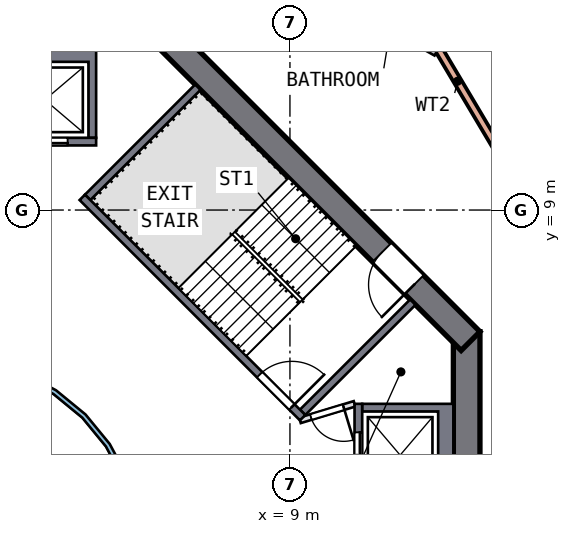
"""IFC4 building model, lengths in metres.
Left out: names, types, materials, properties, quantities, classifications, styles, units other than length and angle.
Written with IfcOpenShell. Run it as: python <this file> out.ifc"""

import sys

from ifc_helpers import new_model, si_unit, direction, frame, frame_2d, origin, place, context, subcontext, project, spatial, polyline, rectangle, outline, extrude, element, fill, save


model = new_model("IFC4")
c1 = context("Model", 3, precision=1e-05, world=origin(), true_north=direction((0.0, 1.0)))
c2 = subcontext(c1, "Body", "Model", "MODEL_VIEW")
j1 = project(units=[si_unit("LENGTHUNIT", "METRE"), si_unit("PLANEANGLEUNIT", "RADIAN")], contexts=[c1])
p1 = place(None, origin())
s1 = spatial("IfcSite", under=j1, at=p1, CompositionType="ELEMENT")
p2 = place(p1, origin())
s2 = spatial("IfcBuilding", under=s1, at=p2, CompositionType="ELEMENT")
p3 = place(p2, frame((0.0, 0.0, 158.5)))
s3 = spatial("IfcBuildingStorey", under=s2, at=p3, CompositionType="ELEMENT", Elevation=158.5)
p4 = place(p3, frame((13.65, -5.799, 0.0), z_axis=(0.0, 0.0, 1.0), x_axis=(0.0, 1.0, 0.0)))
e1 = element("IfcWall", 1, at=p4, inside=s3, PredefinedType="SHEAR", context=c2, shape_type="SweptSolid", body=[
    extrude(rectangle(XDim=11.598, YDim=0.7, at=frame_2d((5.799, 0.0))), origin(), (0.0, 0.0, 1.0), 3.5),
])
p5 = place(p4, frame((4.899, 0.0, 0.0)))
e2 = element("IfcOpeningElement", 2, at=p5, cuts=e1, PredefinedType="OPENING", context=c2, shape_type="SweptSolid", body=[
    extrude(rectangle(XDim=1.8, YDim=2.1, at=frame_2d((0.9, 1.05))), frame((0.0, 0.36, 0.0), z_axis=(0.0, -1.0, 0.0), x_axis=(1.0, 0.0, 0.0)), (0.0, 0.0, 1.0), 0.72),
])
p6 = place(p3, frame((13.752, 5.552, 0.0), z_axis=(0.0, 0.0, 1.0), x_axis=(-0.707106781, 0.707106781, 0.0)))
e3 = element("IfcWall", 3, at=p6, inside=s3, PredefinedType="SHEAR", context=c2, shape_type="SweptSolid", body=[
    extrude(rectangle(XDim=11.598, YDim=0.7, at=frame_2d((5.799, 0.0))), origin(), (0.0, 0.0, 1.0), 3.5),
])
p7 = place(p6, frame((2.099, 0.0, 0.0)))
e4 = element("IfcOpeningElement", 4, at=p7, cuts=e3, PredefinedType="OPENING", context=c2, shape_type="SweptSolid", body=[
    extrude(rectangle(XDim=1.2, YDim=2.1, at=frame_2d((0.6, 1.05))), frame((0.0, 0.36, 0.0), z_axis=(0.0, -1.0, 0.0), x_axis=(1.0, 0.0, 0.0)), (0.0, 0.0, 1.0), 0.72),
])
p8 = place(p3, frame((12.032, 14.711, 0.0), z_axis=(0.0, 0.0, 1.0), x_axis=(0.510837252, -0.859677441, 0.0)))
e5 = element("IfcWall", 5, at=p8, inside=s3, PredefinedType="SOLIDWALL", context=c2, shape_type="SweptSolid", body=[
    extrude(rectangle(XDim=13.0, YDim=0.2, at=frame_2d((6.5, 0.0))), origin(), (0.0, 0.0, 1.0), 3.19),
])
p9 = place(p8, frame((5.6, 0.0, 0.0)))
e6 = element("IfcOpeningElement", 6, at=p9, cuts=e5, PredefinedType="OPENING", context=c2, shape_type="SweptSolid", body=[
    extrude(rectangle(XDim=1.8, YDim=2.4, at=frame_2d((0.9, 1.2))), frame((0.0, 0.11, 0.0), z_axis=(0.0, -1.0, 0.0), x_axis=(1.0, 0.0, 0.0)), (0.0, 0.0, 1.0), 0.22),
])
p10 = place(p3, origin())
e7 = element("IfcWall", 7, at=p10, inside=s3, PredefinedType="SOLIDWALL", context=c2, shape_type="SweptSolid", body=[
    extrude(outline(polyline([(13.3, 3.9), (13.3, 1.2), (10.9, 1.2), (10.9, 1.4), (12.9, 1.4), (12.9, 3.7), (10.9, 3.7), (10.9, 3.9), (13.3, 3.9)])), origin(), (0.0, 0.0, 1.0), 3.19),
])
p11 = place(p3, frame((10.8, 1.2, 0.0), z_axis=(0.0, 0.0, 1.0), x_axis=(0.0, 1.0, 0.0)))
e8 = element("IfcWall", 8, at=p11, inside=s3, PredefinedType="SOLIDWALL", context=c2, shape_type="SweptSolid", body=[
    extrude(rectangle(XDim=2.7, YDim=0.2, at=frame_2d((1.35, 0.0))), origin(), (0.0, 0.0, 1.0), 3.19),
])
p12 = place(p11, frame((0.75, 0.0, 0.0)))
e9 = element("IfcOpeningElement", 9, at=p12, cuts=e8, PredefinedType="OPENING", context=c2, shape_type="SweptSolid", body=[
    extrude(rectangle(XDim=1.2, YDim=2.1, at=frame_2d((0.6, 1.05))), frame((0.0, 0.11, 0.0), z_axis=(0.0, -1.0, 0.0), x_axis=(1.0, 0.0, 0.0)), (0.0, 0.0, 1.0), 0.22),
])
p13 = place(p3, origin())
e10 = element("IfcWall", 10, at=p13, inside=s3, PredefinedType="SOLIDWALL", context=c2, shape_type="SweptSolid", body=[
    extrude(outline(polyline([(3.9, 13.3), (3.9, 10.9), (3.7, 10.9), (3.7, 12.9), (1.4, 12.9), (1.4, 10.9), (1.2, 10.9), (1.2, 13.3), (3.9, 13.3)])), origin(), (0.0, 0.0, 1.0), 3.19),
])
p14 = place(p3, frame((1.2, 10.8, 0.0), z_axis=(0.0, 0.0, 1.0), x_axis=(1.0, 0.0, 0.0)))
e11 = element("IfcWall", 11, at=p14, inside=s3, PredefinedType="SOLIDWALL", context=c2, shape_type="SweptSolid", body=[
    extrude(rectangle(XDim=2.7, YDim=0.2, at=frame_2d((1.35, 0.0))), origin(), (0.0, 0.0, 1.0), 3.19),
])
p15 = place(p14, frame((0.75, 0.0, 0.0)))
e12 = element("IfcOpeningElement", 12, at=p15, cuts=e11, PredefinedType="OPENING", context=c2, shape_type="SweptSolid", body=[
    extrude(rectangle(XDim=1.2, YDim=2.1, at=frame_2d((0.6, 1.05))), frame((0.0, 0.11, 0.0), z_axis=(0.0, -1.0, 0.0), x_axis=(1.0, 0.0, 0.0)), (0.0, 0.0, 1.0), 0.22),
])
p16 = place(p3, frame((3.535, 9.334, 0.0), z_axis=(0.0, 0.0, 1.0), x_axis=(0.707106781, -0.707106781, 0.0)))
e13 = element("IfcWall", 13, at=p16, inside=s3, PredefinedType="SOLIDWALL", context=c2, shape_type="SweptSolid", body=[
    extrude(rectangle(XDim=8.2, YDim=0.2, at=frame_2d((4.1, 0.0))), origin(), (0.0, 0.0, 1.0), 3.19),
])
p17 = place(p16, frame((6.6, 0.0, 0.0)))
e14 = element("IfcOpeningElement", 14, at=p17, cuts=e13, PredefinedType="OPENING", context=c2, shape_type="SweptSolid", body=[
    extrude(rectangle(XDim=1.2, YDim=2.1, at=frame_2d((0.6, 1.05))), frame((0.0, 0.11, 0.0), z_axis=(0.0, -1.0, 0.0), x_axis=(1.0, 0.0, 0.0)), (0.0, 0.0, 1.0), 0.22),
])
for number, where, z_axis, x_axis in (
    (15, (9.334, 3.677, 0.0), (0.0, 0.0, 1.0), (0.707, 0.707, 0.0)),
    (16, (3.677, 9.334, 0.0), (0.0, 0.0, 1.0), (0.707, 0.707, 0.0)),
):
    element("IfcWall", number, at=place(p3, frame(where, z_axis=z_axis, x_axis=x_axis)), inside=s3, PredefinedType="SOLIDWALL", context=c2, shape_type="SweptSolid", body=[
        extrude(rectangle(XDim=4.1, YDim=0.2, at=frame_2d((2.05, 0.0))), origin(), (0.0, 0.0, 1.0), 3.19),
    ])
p18 = place(p3, frame((10.7, 3.9, 0.0), z_axis=(0.0, 0.0, 1.0), x_axis=(-0.957084567, -0.289808785, 0.0)))
e17 = element("IfcWall", 17, at=p18, inside=s3, PredefinedType="PARTITIONING", context=c2, shape_type="SweptSolid", body=[
    extrude(rectangle(XDim=1.501, YDim=0.15, at=frame_2d((0.75, 0.0))), origin(), (0.0, 0.0, 1.0), 3.19),
])
p19 = place(p18, frame((0.301, 0.0, 0.0)))
e18 = element("IfcOpeningElement", 18, at=p19, cuts=e17, PredefinedType="OPENING", context=c2, shape_type="SweptSolid", body=[
    extrude(rectangle(XDim=0.9, YDim=2.1, at=frame_2d((0.45, 1.05))), frame((0.0, 0.085, 0.0), z_axis=(0.0, -1.0, 0.0), x_axis=(1.0, 0.0, 0.0)), (0.0, 0.0, 1.0), 0.17),
])
p20 = place(p3, origin())
e19 = element("IfcWall", 19, at=p20, inside=s3, PredefinedType="SOLIDWALL", context=c2, shape_type="SweptSolid", body=[
    extrude(outline(polyline([(5.021, -0.999), (4.73, -1.959), (4.257, -2.844), (3.62, -3.62), (2.844, -4.257), (1.959, -4.73), (0.999, -5.021), (0.0, -5.12), (-0.999, -5.021), (-1.959, -4.73), (-2.844, -4.257), (-3.62, -3.62), (-4.257, -2.844), (-4.73, -1.959), (-5.021, -0.999), (-5.12, 0.0), (-5.021, 0.999), (-4.73, 1.959), (-4.257, 2.844), (-3.62, 3.62), (-2.844, 4.257), (-1.959, 4.73), (-0.999, 5.021), (0.0, 5.12), (0.999, 5.021), (1.959, 4.73), (2.844, 4.257), (3.62, 3.62), (4.257, 2.844), (4.73, 1.959), (5.021, 0.999), (5.12, 0.0), (5.021, -0.999)]), holes=[polyline([(4.904, 0.976), (4.619, 1.913), (4.157, 2.778), (3.535, 3.535), (2.778, 4.157), (1.913, 4.619), (0.976, 4.904), (0.0, 5.0), (-0.976, 4.904), (-1.913, 4.619), (-2.778, 4.157), (-3.535, 3.535), (-4.157, 2.778), (-4.619, 1.913), (-4.904, 0.976), (-5.0, 0.0), (-4.904, -0.976), (-4.619, -1.913), (-4.157, -2.778), (-3.535, -3.535), (-2.778, -4.157), (-1.913, -4.619), (-0.976, -4.904), (0.0, -5.0), (0.976, -4.904), (1.913, -4.619), (2.778, -4.157), (3.535, -3.535), (4.157, -2.778), (4.619, -1.913), (4.904, -0.976), (5.0, 0.0), (4.904, 0.976)])]), origin(), (0.0, 0.0, 1.0), 3.19),
])
p21 = place(p3, frame((4.535, 17.817, 0.0), z_axis=(0.0, 0.0, 1.0), x_axis=(0.872241337, -0.48907571, 0.0)))
e20 = element("IfcWall", 20, at=p21, inside=s3, PredefinedType="SOLIDWALL", context=c2, shape_type="SweptSolid", body=[
    extrude(rectangle(XDim=9.536, YDim=0.2, at=frame_2d((4.768, 0.0))), origin(), (0.0, 0.0, 1.0), 3.19),
])
p22 = place(p21, frame((1.9, 0.0, 0.0)))
e21 = element("IfcOpeningElement", 21, at=p22, cuts=e20, PredefinedType="OPENING", context=c2, shape_type="SweptSolid", body=[
    extrude(rectangle(XDim=1.0, YDim=2.1, at=frame_2d((0.5, 1.05))), frame((0.0, 0.11, 0.0), z_axis=(0.0, -1.0, 0.0), x_axis=(1.0, 0.0, 0.0)), (0.0, 0.0, 1.0), 0.22),
])
p23 = place(p12, origin())
e22 = element("IfcDoor", 22, at=p23, inside=s3, OperationType="DOUBLE_DOOR_SLIDING", PredefinedType="DOOR", context=c2, shape_type="SweptSolid", body=[
    extrude(rectangle(XDim=1.2, YDim=2.1, at=frame_2d((0.6, 1.05))), frame((0.0, 0.025, 0.0), z_axis=(0.0, -1.0, 0.0), x_axis=(1.0, 0.0, 0.0)), (0.0, 0.0, 1.0), 0.05),
])
fill(e9, e22)
p24 = place(p15, origin())
e23 = element("IfcDoor", 23, at=p24, inside=s3, OperationType="DOUBLE_DOOR_SLIDING", PredefinedType="DOOR", context=c2, shape_type="SweptSolid", body=[
    extrude(rectangle(XDim=1.2, YDim=2.1, at=frame_2d((0.6, 1.05))), frame((0.0, 0.025, 0.0), z_axis=(0.0, -1.0, 0.0), x_axis=(1.0, 0.0, 0.0)), (0.0, 0.0, 1.0), 0.05),
])
fill(e12, e23)
p25 = place(p17, origin())
e24 = element("IfcDoor", 24, at=p25, inside=s3, OperationType="SINGLE_SWING_RIGHT", PredefinedType="DOOR", context=c2, shape_type="SweptSolid", body=[
    extrude(rectangle(XDim=1.2, YDim=2.1, at=frame_2d((0.6, 1.05))), frame((0.0, 0.025, 0.0), z_axis=(0.0, -1.0, 0.0), x_axis=(1.0, 0.0, 0.0)), (0.0, 0.0, 1.0), 0.05),
])
fill(e14, e24)
p26 = place(p7, origin())
e25 = element("IfcDoor", 25, at=p26, inside=s3, OperationType="SINGLE_SWING_LEFT", PredefinedType="DOOR", context=c2, shape_type="SweptSolid", body=[
    extrude(rectangle(XDim=1.2, YDim=2.1, at=frame_2d((0.6, 1.05))), frame((0.0, 0.025, 0.0), z_axis=(0.0, -1.0, 0.0), x_axis=(1.0, 0.0, 0.0)), (0.0, 0.0, 1.0), 0.05),
])
fill(e4, e25)
p27 = place(p19, origin())
e26 = element("IfcDoor", 26, at=p27, inside=s3, OperationType="SINGLE_SWING_LEFT", PredefinedType="DOOR", context=c2, shape_type="SweptSolid", body=[
    extrude(rectangle(XDim=0.9, YDim=2.1, at=frame_2d((0.45, 1.05))), frame((0.0, 0.025, 0.0), z_axis=(0.0, -1.0, 0.0), x_axis=(1.0, 0.0, 0.0)), (0.0, 0.0, 1.0), 0.05),
])
fill(e18, e26)
save(model, sys.argv[1])
